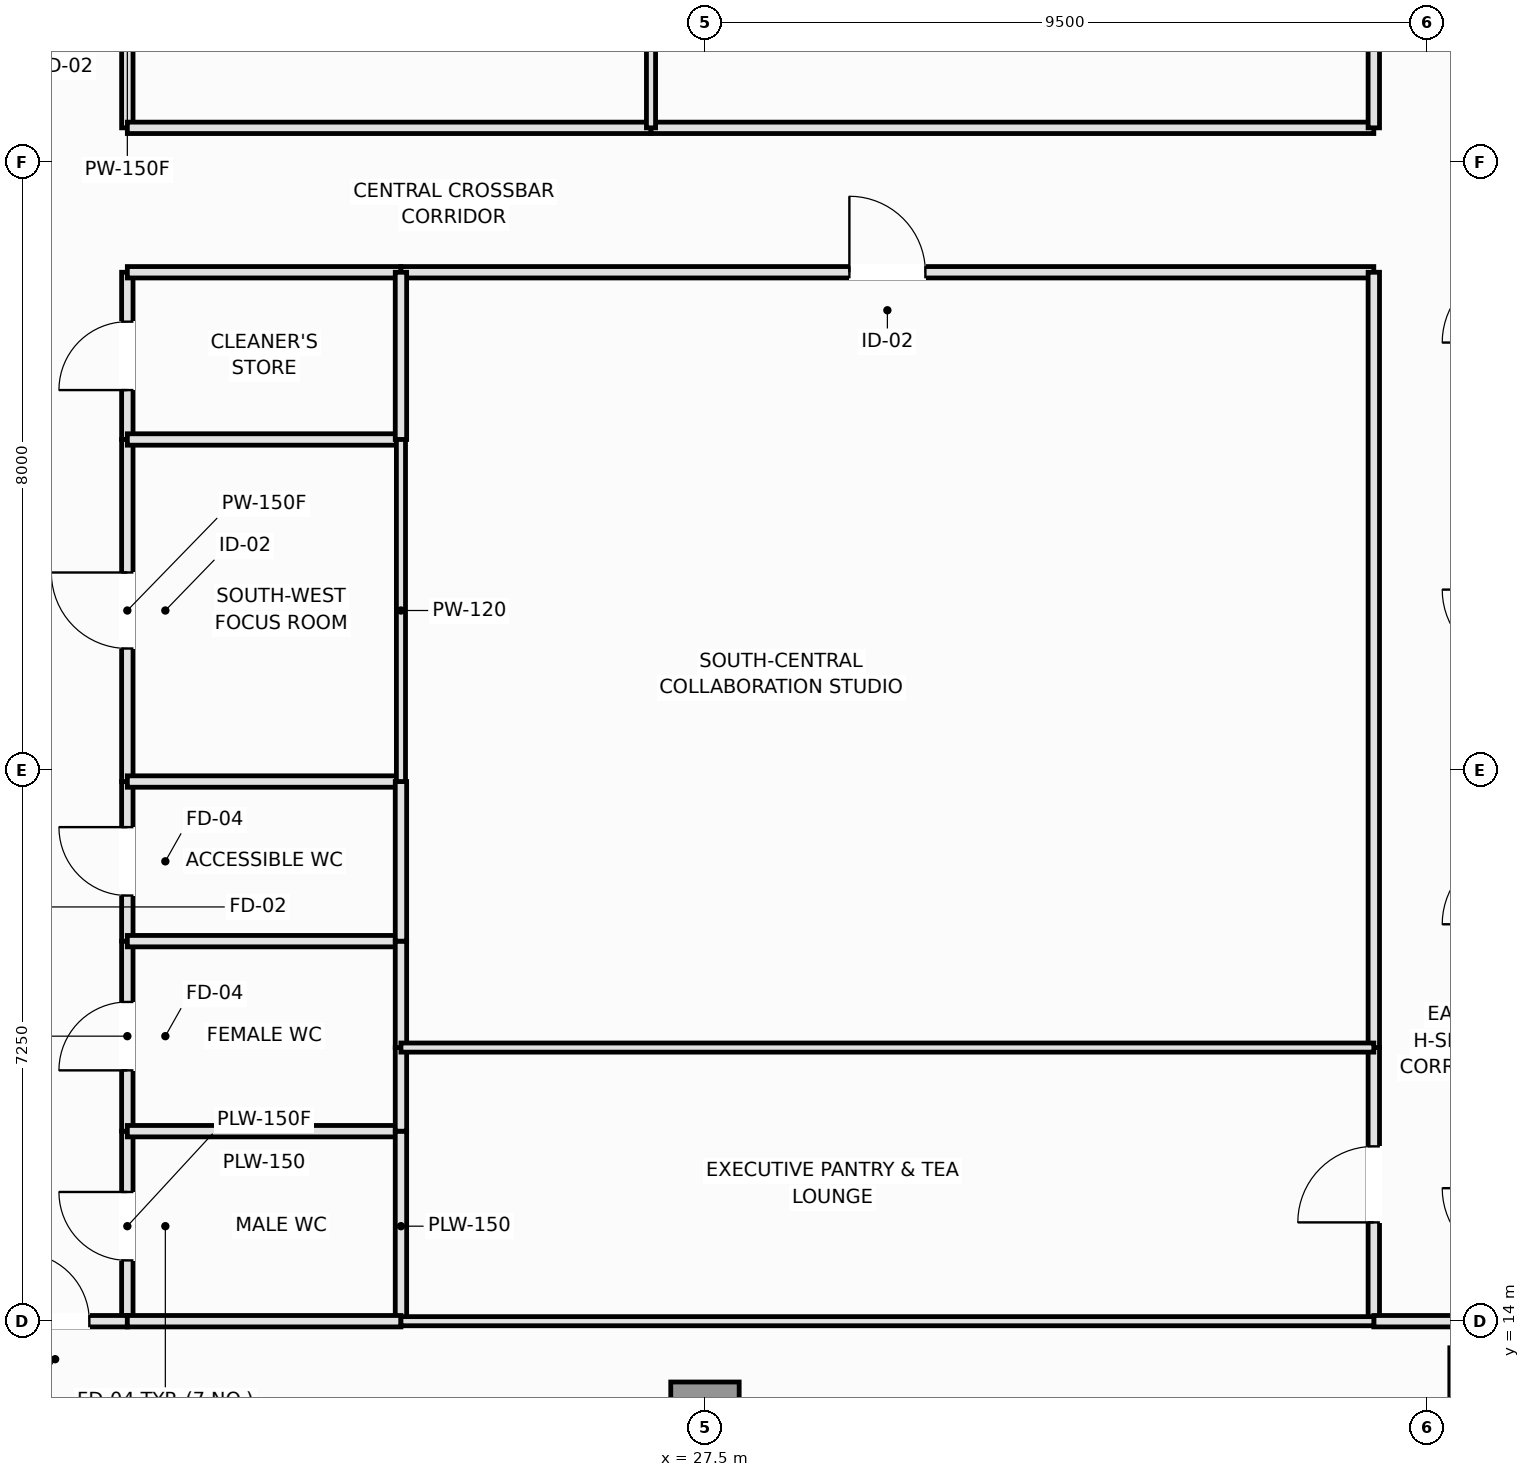
"""IFC4 building model, lengths in metres.
Left out: names, types, materials, properties, quantities, classifications, styles, units other than length and angle.
Written with IfcOpenShell. Run it as: python <this file> out.ifc"""

import sys

from ifc_helpers import new_model, si_unit, direction, frame, frame_2d, origin, origin_2d, place, context, subcontext, project, spatial, rectangle, extrude, element, fill, save


model = new_model("IFC4")
c1 = context("Model", 3, precision=1e-05, world=origin(), true_north=direction((0.0, 1.0)))
c2 = subcontext(c1, "Body", "Model", "MODEL_VIEW")
j1 = project(units=[si_unit("LENGTHUNIT", "METRE"), si_unit("PLANEANGLEUNIT", "RADIAN")], contexts=[c1])
p1 = place(None, origin())
s1 = spatial("IfcSite", under=j1, at=p1, CompositionType="ELEMENT")
p2 = place(p1, origin())
s2 = spatial("IfcBuilding", under=s1, at=p2, CompositionType="ELEMENT")
p3 = place(p2, frame((0.0, 0.0, 284.75)))
s3 = spatial("IfcBuildingStorey", under=s2, at=p3, CompositionType="ELEMENT", Elevation=284.75)
p4 = place(p3, frame((38.2, 12.75, 0.0), z_axis=(0.0, 0.0, 1.0), x_axis=(1.0, 0.0, 0.0)))
e1 = element("IfcColumn", 1, at=p4, inside=s3, PredefinedType="COLUMN", context=c2, shape_type="SweptSolid", body=[
    extrude(rectangle(XDim=1.8, YDim=1.8, at=origin_2d()), origin(), (0.0, 0.0, 1.0), 3.55),
])
p5 = place(p3, frame((27.5, 12.75, 0.0), z_axis=(0.0, 0.0, 1.0), x_axis=(1.0, 0.0, 0.0)))
e2 = element("IfcColumn", 2, at=p5, inside=s3, PredefinedType="COLUMN", context=c2, shape_type="SweptSolid", body=[
    extrude(rectangle(XDim=0.9, YDim=0.9, at=origin_2d()), origin(), (0.0, 0.0, 1.0), 3.55),
])
p6 = place(p3, frame((19.9, 29.7, 0.0), z_axis=(0.0, 0.0, 1.0), x_axis=(0.0, 1.0, 0.0)))
e3 = element("IfcWall", 3, at=p6, inside=s3, PredefinedType="PARTITIONING", context=c2, shape_type="SweptSolid", body=[
    extrude(rectangle(XDim=4.9, YDim=0.15, at=frame_2d((2.45, 0.0))), origin(), (0.0, 0.0, 1.0), 3.39),
])
p7 = place(p6, frame((1.95, 0.0, 0.0)))
e4 = element("IfcOpeningElement", 4, at=p7, cuts=e3, PredefinedType="OPENING", context=c2, shape_type="SweptSolid", body=[
    extrude(rectangle(XDim=1.0, YDim=2.15, at=frame_2d((0.5, 1.075))), frame((0.0, 0.085, 0.0), z_axis=(0.0, -1.0, 0.0), x_axis=(1.0, 0.0, 0.0)), (0.0, 0.0, 1.0), 0.17),
])
p8 = place(p3, frame((19.9, 14.0, 0.0), z_axis=(0.0, 0.0, 1.0), x_axis=(0.0, 1.0, 0.0)))
e5 = element("IfcWall", 5, at=p8, inside=s3, PredefinedType="PLUMBINGWALL", context=c2, shape_type="SweptSolid", body=[
    extrude(rectangle(XDim=2.5, YDim=0.15, at=frame_2d((1.25, 0.0))), origin(), (0.0, 0.0, 1.0), 3.39),
])
p9 = place(p8, frame((0.8, 0.0, 0.0)))
e6 = element("IfcOpeningElement", 6, at=p9, cuts=e5, PredefinedType="OPENING", context=c2, shape_type="SweptSolid", body=[
    extrude(rectangle(XDim=0.9, YDim=2.1, at=frame_2d((0.45, 1.05))), frame((0.0, 0.085, 0.0), z_axis=(0.0, -1.0, 0.0), x_axis=(1.0, 0.0, 0.0)), (0.0, 0.0, 1.0), 0.17),
])
p10 = place(p3, frame((19.9, 16.5, 0.0), z_axis=(0.0, 0.0, 1.0), x_axis=(0.0, 1.0, 0.0)))
e7 = element("IfcWall", 7, at=p10, inside=s3, PredefinedType="PLUMBINGWALL", context=c2, shape_type="SweptSolid", body=[
    extrude(rectangle(XDim=2.5, YDim=0.15, at=frame_2d((1.25, 0.0))), origin(), (0.0, 0.0, 1.0), 3.39),
])
p11 = place(p10, frame((0.8, 0.0, 0.0)))
e8 = element("IfcOpeningElement", 8, at=p11, cuts=e7, PredefinedType="OPENING", context=c2, shape_type="SweptSolid", body=[
    extrude(rectangle(XDim=0.9, YDim=2.1, at=frame_2d((0.45, 1.05))), frame((0.0, 0.085, 0.0), z_axis=(0.0, -1.0, 0.0), x_axis=(1.0, 0.0, 0.0)), (0.0, 0.0, 1.0), 0.17),
])
p12 = place(p3, frame((19.9, 19.0, 0.0), z_axis=(0.0, 0.0, 1.0), x_axis=(0.0, 1.0, 0.0)))
e9 = element("IfcWall", 9, at=p12, inside=s3, PredefinedType="PLUMBINGWALL", context=c2, shape_type="SweptSolid", body=[
    extrude(rectangle(XDim=2.1, YDim=0.15, at=frame_2d((1.05, 0.0))), origin(), (0.0, 0.0, 1.0), 3.39),
])
p13 = place(p12, frame((0.6, 0.0, 0.0)))
e10 = element("IfcOpeningElement", 10, at=p13, cuts=e9, PredefinedType="OPENING", context=c2, shape_type="SweptSolid", body=[
    extrude(rectangle(XDim=0.9, YDim=2.1, at=frame_2d((0.45, 1.05))), frame((0.0, 0.085, 0.0), z_axis=(0.0, -1.0, 0.0), x_axis=(1.0, 0.0, 0.0)), (0.0, 0.0, 1.0), 0.17),
])
p14 = place(p3, frame((19.9, 25.6, 0.0), z_axis=(0.0, 0.0, 1.0), x_axis=(0.0, 1.0, 0.0)))
e11 = element("IfcWall", 11, at=p14, inside=s3, PredefinedType="PLUMBINGWALL", context=c2, shape_type="SweptSolid", body=[
    extrude(rectangle(XDim=2.2, YDim=0.15, at=frame_2d((1.1, 0.0))), origin(), (0.0, 0.0, 1.0), 3.39),
])
p15 = place(p14, frame((0.65, 0.0, 0.0)))
e12 = element("IfcOpeningElement", 12, at=p15, cuts=e11, PredefinedType="OPENING", context=c2, shape_type="SweptSolid", body=[
    extrude(rectangle(XDim=0.9, YDim=2.1, at=frame_2d((0.45, 1.05))), frame((0.0, 0.085, 0.0), z_axis=(0.0, -1.0, 0.0), x_axis=(1.0, 0.0, 0.0)), (0.0, 0.0, 1.0), 0.17),
])
p16 = place(p3, frame((19.9, 21.1, 0.0), z_axis=(0.0, 0.0, 1.0), x_axis=(0.0, 1.0, 0.0)))
e13 = element("IfcWall", 13, at=p16, inside=s3, PredefinedType="PARTITIONING", context=c2, shape_type="SweptSolid", body=[
    extrude(rectangle(XDim=4.5, YDim=0.15, at=frame_2d((2.25, 0.0))), origin(), (0.0, 0.0, 1.0), 3.39),
])
p17 = place(p16, frame((1.75, 0.0, 0.0)))
e14 = element("IfcOpeningElement", 14, at=p17, cuts=e13, PredefinedType="OPENING", context=c2, shape_type="SweptSolid", body=[
    extrude(rectangle(XDim=1.0, YDim=2.15, at=frame_2d((0.5, 1.075))), frame((0.0, 0.085, 0.0), z_axis=(0.0, -1.0, 0.0), x_axis=(1.0, 0.0, 0.0)), (0.0, 0.0, 1.0), 0.17),
])
p18 = place(p3, frame((18.0, 14.0, 0.0), z_axis=(0.0, 0.0, 1.0), x_axis=(1.0, 0.0, 0.0)))
e15 = element("IfcWall", 15, at=p18, inside=s3, PredefinedType="PARTITIONING", context=c2, shape_type="SweptSolid", body=[
    extrude(rectangle(XDim=1.9, YDim=0.15, at=frame_2d((0.95, 0.0))), origin(), (0.0, 0.0, 1.0), 3.39),
])
p19 = place(p18, frame((0.5, 0.0, 0.0)))
e16 = element("IfcOpeningElement", 16, at=p19, cuts=e15, PredefinedType="OPENING", context=c2, shape_type="SweptSolid", body=[
    extrude(rectangle(XDim=0.9, YDim=2.1, at=frame_2d((0.45, 1.05))), frame((0.0, 0.085, 0.0), z_axis=(0.0, -1.0, 0.0), x_axis=(1.0, 0.0, 0.0)), (0.0, 0.0, 1.0), 0.17),
])
p20 = place(p3, frame((19.9, 29.7, 0.0), z_axis=(0.0, 0.0, 1.0), x_axis=(1.0, 0.0, 0.0)))
e17 = element("IfcWall", 17, at=p20, inside=s3, PredefinedType="PARTITIONING", context=c2, shape_type="SweptSolid", body=[
    extrude(rectangle(XDim=6.89, YDim=0.15, at=frame_2d((3.445, 0.0))), origin(), (0.0, 0.0, 1.0), 3.39),
])
p21 = place(p3, frame((26.79, 29.7, 0.0), z_axis=(0.0, 0.0, 1.0), x_axis=(1.0, 0.0, 0.0)))
e18 = element("IfcWall", 18, at=p21, inside=s3, PredefinedType="PARTITIONING", context=c2, shape_type="SweptSolid", body=[
    extrude(rectangle(XDim=9.51, YDim=0.15, at=frame_2d((4.755, 0.0))), origin(), (0.0, 0.0, 1.0), 3.39),
])
p22 = place(p3, frame((19.9, 27.8, 0.0), z_axis=(0.0, 0.0, 1.0), x_axis=(1.0, 0.0, 0.0)))
e19 = element("IfcWall", 19, at=p22, inside=s3, PredefinedType="PLUMBINGWALL", context=c2, shape_type="SweptSolid", body=[
    extrude(rectangle(XDim=3.6, YDim=0.15, at=frame_2d((1.8, 0.0))), origin(), (0.0, 0.0, 1.0), 3.39),
])
p23 = place(p3, frame((23.5, 27.8, 0.0), z_axis=(0.0, 0.0, 1.0), x_axis=(1.0, 0.0, 0.0)))
e20 = element("IfcWall", 20, at=p23, inside=s3, PredefinedType="PARTITIONING", context=c2, shape_type="SweptSolid", body=[
    extrude(rectangle(XDim=12.8, YDim=0.15, at=frame_2d((6.4, 0.0))), origin(), (0.0, 0.0, 1.0), 3.39),
])
p24 = place(p23, frame((5.9, 0.0, 0.0)))
e21 = element("IfcOpeningElement", 21, at=p24, cuts=e20, PredefinedType="OPENING", context=c2, shape_type="SweptSolid", body=[
    extrude(rectangle(XDim=1.0, YDim=2.15, at=frame_2d((0.5, 1.075))), frame((0.0, 0.085, 0.0), z_axis=(0.0, -1.0, 0.0), x_axis=(1.0, 0.0, 0.0)), (0.0, 0.0, 1.0), 0.17),
])
p25 = place(p3, frame((36.3, 29.7, 0.0), z_axis=(0.0, 0.0, 1.0), x_axis=(0.0, 1.0, 0.0)))
e22 = element("IfcWall", 22, at=p25, inside=s3, PredefinedType="PARTITIONING", context=c2, shape_type="SweptSolid", body=[
    extrude(rectangle(XDim=4.9, YDim=0.15, at=frame_2d((2.45, 0.0))), origin(), (0.0, 0.0, 1.0), 3.39),
])
p26 = place(p25, frame((1.95, 0.0, 0.0)))
e23 = element("IfcOpeningElement", 23, at=p26, cuts=e22, PredefinedType="OPENING", context=c2, shape_type="SweptSolid", body=[
    extrude(rectangle(XDim=1.0, YDim=2.15, at=frame_2d((0.5, 1.075))), frame((0.0, 0.085, 0.0), z_axis=(0.0, -1.0, 0.0), x_axis=(1.0, 0.0, 0.0)), (0.0, 0.0, 1.0), 0.17),
])
p27 = place(p3, frame((36.3, 14.0, 0.0), z_axis=(0.0, 0.0, 1.0), x_axis=(0.0, 1.0, 0.0)))
e24 = element("IfcWall", 24, at=p27, inside=s3, PredefinedType="PARTITIONING", context=c2, shape_type="SweptSolid", body=[
    extrude(rectangle(XDim=3.6, YDim=0.15, at=frame_2d((1.8, 0.0))), origin(), (0.0, 0.0, 1.0), 3.39),
])
p28 = place(p27, frame((1.3, 0.0, 0.0)))
e25 = element("IfcOpeningElement", 25, at=p28, cuts=e24, PredefinedType="OPENING", context=c2, shape_type="SweptSolid", body=[
    extrude(rectangle(XDim=1.0, YDim=2.15, at=frame_2d((0.5, 1.075))), frame((0.0, 0.085, 0.0), z_axis=(0.0, -1.0, 0.0), x_axis=(1.0, 0.0, 0.0)), (0.0, 0.0, 1.0), 0.17),
])
p29 = place(p3, frame((36.3, 17.6, 0.0), z_axis=(0.0, 0.0, 1.0), x_axis=(0.0, 1.0, 0.0)))
e26 = element("IfcWall", 26, at=p29, inside=s3, PredefinedType="PARTITIONING", context=c2, shape_type="SweptSolid", body=[
    extrude(rectangle(XDim=10.2, YDim=0.15, at=frame_2d((5.1, 0.0))), origin(), (0.0, 0.0, 1.0), 3.39),
])
p30 = place(p3, frame((36.3, 14.0, 0.0), z_axis=(0.0, 0.0, 1.0), x_axis=(1.0, 0.0, 0.0)))
e27 = element("IfcWall", 27, at=p30, inside=s3, PredefinedType="PARTITIONING", context=c2, shape_type="SweptSolid", body=[
    extrude(rectangle(XDim=1.9, YDim=0.15, at=frame_2d((0.95, 0.0))), origin(), (0.0, 0.0, 1.0), 3.39),
])
p31 = place(p3, frame((26.79, 29.7, 0.0), z_axis=(0.0, 0.0, 1.0), x_axis=(0.0, 1.0, 0.0)))
e28 = element("IfcWall", 28, at=p31, inside=s3, PredefinedType="PARTITIONING", context=c2, shape_type="SweptSolid", body=[
    extrude(rectangle(XDim=4.9, YDim=0.12, at=frame_2d((2.45, 0.0))), origin(), (0.0, 0.0, 1.0), 3.39),
])
p32 = place(p3, frame((19.9, 16.5, 0.0), z_axis=(0.0, 0.0, 1.0), x_axis=(1.0, 0.0, 0.0)))
e29 = element("IfcWall", 29, at=p32, inside=s3, PredefinedType="PLUMBINGWALL", context=c2, shape_type="SweptSolid", body=[
    extrude(rectangle(XDim=3.6, YDim=0.15, at=frame_2d((1.8, 0.0))), origin(), (0.0, 0.0, 1.0), 3.39),
])
p33 = place(p3, frame((23.5, 14.0, 0.0), z_axis=(0.0, 0.0, 1.0), x_axis=(0.0, 1.0, 0.0)))
e30 = element("IfcWall", 30, at=p33, inside=s3, PredefinedType="PLUMBINGWALL", context=c2, shape_type="SweptSolid", body=[
    extrude(rectangle(XDim=2.5, YDim=0.15, at=frame_2d((1.25, 0.0))), origin(), (0.0, 0.0, 1.0), 3.39),
])
for number, where, z_axis, x_axis in (
    (31, (19.9, 14.0, 0.0), (0.0, 0.0, 1.0), (1.0, 0.0, 0.0)),
    (32, (19.9, 19.0, 0.0), (0.0, 0.0, 1.0), (1.0, 0.0, 0.0)),
):
    element("IfcWall", number, at=place(p3, frame(where, z_axis=z_axis, x_axis=x_axis)), inside=s3, PredefinedType="PLUMBINGWALL", context=c2, shape_type="SweptSolid", body=[
        extrude(rectangle(XDim=3.6, YDim=0.15, at=frame_2d((1.8, 0.0))), origin(), (0.0, 0.0, 1.0), 3.39),
    ])
p34 = place(p3, frame((23.5, 16.5, 0.0), z_axis=(0.0, 0.0, 1.0), x_axis=(0.0, 1.0, 0.0)))
e33 = element("IfcWall", 33, at=p34, inside=s3, PredefinedType="PLUMBINGWALL", context=c2, shape_type="SweptSolid", body=[
    extrude(rectangle(XDim=1.1, YDim=0.15, at=frame_2d((0.55, 0.0))), origin(), (0.0, 0.0, 1.0), 3.39),
])
p35 = place(p3, frame((23.5, 17.6, 0.0), z_axis=(0.0, 0.0, 1.0), x_axis=(0.0, 1.0, 0.0)))
e34 = element("IfcWall", 34, at=p35, inside=s3, PredefinedType="PLUMBINGWALL", context=c2, shape_type="SweptSolid", body=[
    extrude(rectangle(XDim=1.4, YDim=0.15, at=frame_2d((0.7, 0.0))), origin(), (0.0, 0.0, 1.0), 3.39),
])
p36 = place(p3, frame((19.9, 21.1, 0.0), z_axis=(0.0, 0.0, 1.0), x_axis=(1.0, 0.0, 0.0)))
e35 = element("IfcWall", 35, at=p36, inside=s3, PredefinedType="PLUMBINGWALL", context=c2, shape_type="SweptSolid", body=[
    extrude(rectangle(XDim=3.6, YDim=0.15, at=frame_2d((1.8, 0.0))), origin(), (0.0, 0.0, 1.0), 3.39),
])
p37 = place(p3, frame((23.5, 19.0, 0.0), z_axis=(0.0, 0.0, 1.0), x_axis=(0.0, 1.0, 0.0)))
e36 = element("IfcWall", 36, at=p37, inside=s3, PredefinedType="PLUMBINGWALL", context=c2, shape_type="SweptSolid", body=[
    extrude(rectangle(XDim=2.1, YDim=0.15, at=frame_2d((1.05, 0.0))), origin(), (0.0, 0.0, 1.0), 3.39),
])
p38 = place(p3, frame((19.9, 25.6, 0.0), z_axis=(0.0, 0.0, 1.0), x_axis=(1.0, 0.0, 0.0)))
e37 = element("IfcWall", 37, at=p38, inside=s3, PredefinedType="PLUMBINGWALL", context=c2, shape_type="SweptSolid", body=[
    extrude(rectangle(XDim=3.6, YDim=0.15, at=frame_2d((1.8, 0.0))), origin(), (0.0, 0.0, 1.0), 3.39),
])
p39 = place(p3, frame((23.5, 25.6, 0.0), z_axis=(0.0, 0.0, 1.0), x_axis=(0.0, 1.0, 0.0)))
e38 = element("IfcWall", 38, at=p39, inside=s3, PredefinedType="PLUMBINGWALL", context=c2, shape_type="SweptSolid", body=[
    extrude(rectangle(XDim=2.2, YDim=0.15, at=frame_2d((1.1, 0.0))), origin(), (0.0, 0.0, 1.0), 3.39),
])
p40 = place(p3, frame((23.5, 21.1, 0.0), z_axis=(0.0, 0.0, 1.0), x_axis=(0.0, 1.0, 0.0)))
e39 = element("IfcWall", 39, at=p40, inside=s3, PredefinedType="PARTITIONING", context=c2, shape_type="SweptSolid", body=[
    extrude(rectangle(XDim=4.5, YDim=0.12, at=frame_2d((2.25, 0.0))), origin(), (0.0, 0.0, 1.0), 3.39),
])
for number, where, z_axis, x_axis in (
    (40, (23.5, 17.6, 0.0), (0.0, 0.0, 1.0), (1.0, 0.0, 0.0)),
    (41, (23.5, 14.0, 0.0), (0.0, 0.0, 1.0), (1.0, 0.0, 0.0)),
):
    element("IfcWall", number, at=place(p3, frame(where, z_axis=z_axis, x_axis=x_axis)), inside=s3, PredefinedType="PARTITIONING", context=c2, shape_type="SweptSolid", body=[
        extrude(rectangle(XDim=12.8, YDim=0.12, at=frame_2d((6.4, 0.0))), origin(), (0.0, 0.0, 1.0), 3.39),
    ])
p41 = place(p9, origin())
e42 = element("IfcDoor", 42, at=p41, inside=s3, OperationType="SINGLE_SWING_RIGHT", PredefinedType="DOOR", context=c2, shape_type="SweptSolid", body=[
    extrude(rectangle(XDim=0.9, YDim=2.1, at=frame_2d((0.45, 1.05))), frame((0.0, 0.025, 0.0), z_axis=(0.0, -1.0, 0.0), x_axis=(1.0, 0.0, 0.0)), (0.0, 0.0, 1.0), 0.05),
])
fill(e6, e42)
p42 = place(p11, origin())
e43 = element("IfcDoor", 43, at=p42, inside=s3, OperationType="SINGLE_SWING_LEFT", PredefinedType="DOOR", context=c2, shape_type="SweptSolid", body=[
    extrude(rectangle(XDim=0.9, YDim=2.1, at=frame_2d((0.45, 1.05))), frame((0.0, 0.025, 0.0), z_axis=(0.0, -1.0, 0.0), x_axis=(1.0, 0.0, 0.0)), (0.0, 0.0, 1.0), 0.05),
])
fill(e8, e43)
p43 = place(p13, origin())
e44 = element("IfcDoor", 44, at=p43, inside=s3, OperationType="SINGLE_SWING_RIGHT", PredefinedType="DOOR", context=c2, shape_type="SweptSolid", body=[
    extrude(rectangle(XDim=0.9, YDim=2.1, at=frame_2d((0.45, 1.05))), frame((0.0, 0.025, 0.0), z_axis=(0.0, -1.0, 0.0), x_axis=(1.0, 0.0, 0.0)), (0.0, 0.0, 1.0), 0.05),
])
fill(e10, e44)
p44 = place(p15, origin())
e45 = element("IfcDoor", 45, at=p44, inside=s3, OperationType="SINGLE_SWING_LEFT", PredefinedType="DOOR", context=c2, shape_type="SweptSolid", body=[
    extrude(rectangle(XDim=0.9, YDim=2.1, at=frame_2d((0.45, 1.05))), frame((0.0, 0.025, 0.0), z_axis=(0.0, -1.0, 0.0), x_axis=(1.0, 0.0, 0.0)), (0.0, 0.0, 1.0), 0.05),
])
fill(e12, e45)
p45 = place(p17, origin())
e46 = element("IfcDoor", 46, at=p45, inside=s3, OperationType="SINGLE_SWING_RIGHT", PredefinedType="DOOR", context=c2, shape_type="SweptSolid", body=[
    extrude(rectangle(XDim=1.0, YDim=2.15, at=frame_2d((0.5, 1.075))), frame((0.0, 0.025, 0.0), z_axis=(0.0, -1.0, 0.0), x_axis=(1.0, 0.0, 0.0)), (0.0, 0.0, 1.0), 0.05),
])
fill(e14, e46)
p46 = place(p19, origin())
e47 = element("IfcDoor", 47, at=p46, inside=s3, OperationType="SINGLE_SWING_LEFT", PredefinedType="DOOR", context=c2, shape_type="SweptSolid", body=[
    extrude(rectangle(XDim=0.9, YDim=2.1, at=frame_2d((0.45, 1.05))), frame((0.0, 0.025, 0.0), z_axis=(0.0, -1.0, 0.0), x_axis=(1.0, 0.0, 0.0)), (0.0, 0.0, 1.0), 0.05),
])
fill(e16, e47)
p47 = place(p24, origin())
e48 = element("IfcDoor", 48, at=p47, inside=s3, OperationType="SINGLE_SWING_LEFT", PredefinedType="DOOR", context=c2, shape_type="SweptSolid", body=[
    extrude(rectangle(XDim=1.0, YDim=2.15, at=frame_2d((0.5, 1.075))), frame((0.0, 0.025, 0.0), z_axis=(0.0, -1.0, 0.0), x_axis=(1.0, 0.0, 0.0)), (0.0, 0.0, 1.0), 0.05),
])
fill(e21, e48)
p48 = place(p28, origin())
e49 = element("IfcDoor", 49, at=p48, inside=s3, OperationType="SINGLE_SWING_LEFT", PredefinedType="DOOR", context=c2, shape_type="SweptSolid", body=[
    extrude(rectangle(XDim=1.0, YDim=2.15, at=frame_2d((0.5, 1.075))), frame((0.0, 0.025, 0.0), z_axis=(0.0, -1.0, 0.0), x_axis=(1.0, 0.0, 0.0)), (0.0, 0.0, 1.0), 0.05),
])
fill(e25, e49)
save(model, sys.argv[1])
